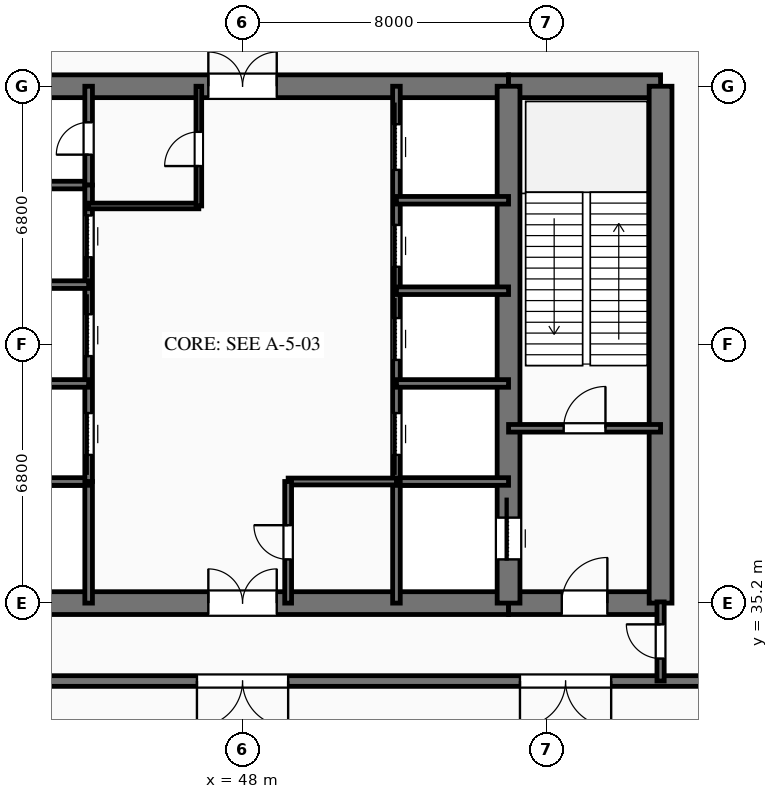
"""IFC4 building model, lengths in metres.
Left out: names, types, materials, properties, quantities, classifications, styles, units other than length and angle.
Written with IfcOpenShell. Run it as: python <this file> out.ifc"""

import sys

from ifc_helpers import new_model, si_unit, direction, frame, frame_2d, origin, place, context, subcontext, project, spatial, rectangle, extrude, element, fill, save


model = new_model("IFC4")
c1 = context("Model", 3, precision=1e-05, world=origin(), true_north=direction((0.0, 1.0)))
c2 = subcontext(c1, "Body", "Model", "MODEL_VIEW")
j1 = project(units=[si_unit("LENGTHUNIT", "METRE"), si_unit("PLANEANGLEUNIT", "RADIAN")], contexts=[c1])
p1 = place(None, origin())
s1 = spatial("IfcSite", under=j1, at=p1, CompositionType="ELEMENT")
p2 = place(p1, origin())
s2 = spatial("IfcBuilding", under=s1, at=p2, CompositionType="ELEMENT")
p3 = place(p2, origin())
s3 = spatial("IfcBuildingStorey", under=s2, at=p3, CompositionType="ELEMENT", Elevation=0.0)
p4 = place(p3, frame((41.0, 35.2, 0.0), z_axis=(0.0, 0.0, 1.0), x_axis=(1.0, 0.0, 0.0)))
e1 = element("IfcWall", 1, at=p4, inside=s3, PredefinedType="SHEAR", context=c2, shape_type="SweptSolid", body=[
    extrude(rectangle(XDim=14.0, YDim=0.6, at=frame_2d((7.0, 0.0))), origin(), (0.0, 0.0, 1.0), 5.72),
])
p5 = place(p4, frame((6.1, 0.0, 0.0)))
e2 = element("IfcOpeningElement", 2, at=p5, cuts=e1, PredefinedType="OPENING", context=c2, shape_type="SweptSolid", body=[
    extrude(rectangle(XDim=1.8, YDim=2.25, at=frame_2d((0.9, 1.125))), frame((0.0, 0.31, 0.0), z_axis=(0.0, -1.0, 0.0), x_axis=(1.0, 0.0, 0.0)), (0.0, 0.0, 1.0), 0.62),
])
p6 = place(p3, frame((55.0, 35.2, 0.0), z_axis=(0.0, 0.0, 1.0), x_axis=(1.0, 0.0, 0.0)))
e3 = element("IfcWall", 3, at=p6, inside=s3, PredefinedType="SHEAR", context=c2, shape_type="SweptSolid", body=[
    extrude(rectangle(XDim=4.0, YDim=0.6, at=frame_2d((2.0, 0.0))), origin(), (0.0, 0.0, 1.0), 5.72),
])
p7 = place(p6, frame((1.4, 0.0, 0.0)))
e4 = element("IfcOpeningElement", 4, at=p7, cuts=e3, PredefinedType="OPENING", context=c2, shape_type="SweptSolid", body=[
    extrude(rectangle(XDim=1.2, YDim=2.15, at=frame_2d((0.6, 1.075))), frame((0.0, 0.31, 0.0), z_axis=(0.0, -1.0, 0.0), x_axis=(1.0, 0.0, 0.0)), (0.0, 0.0, 1.0), 0.62),
])
p8 = place(p3, frame((41.0, 48.8, 0.0), z_axis=(0.0, 0.0, 1.0), x_axis=(1.0, 0.0, 0.0)))
e5 = element("IfcWall", 5, at=p8, inside=s3, PredefinedType="SHEAR", context=c2, shape_type="SweptSolid", body=[
    extrude(rectangle(XDim=14.0, YDim=0.6, at=frame_2d((7.0, 0.0))), origin(), (0.0, 0.0, 1.0), 5.72),
])
p9 = place(p8, frame((6.1, 0.0, 0.0)))
e6 = element("IfcOpeningElement", 6, at=p9, cuts=e5, PredefinedType="OPENING", context=c2, shape_type="SweptSolid", body=[
    extrude(rectangle(XDim=1.8, YDim=2.25, at=frame_2d((0.9, 1.125))), frame((0.0, 0.31, 0.0), z_axis=(0.0, -1.0, 0.0), x_axis=(1.0, 0.0, 0.0)), (0.0, 0.0, 1.0), 0.62),
])
p10 = place(p3, frame((55.0, 48.8, 0.0), z_axis=(0.0, 0.0, 1.0), x_axis=(1.0, 0.0, 0.0)))
e7 = element("IfcWall", 7, at=p10, inside=s3, PredefinedType="SHEAR", context=c2, shape_type="SweptSolid", body=[
    extrude(rectangle(XDim=4.0, YDim=0.6, at=frame_2d((2.0, 0.0))), origin(), (0.0, 0.0, 1.0), 5.72),
])
p11 = place(p3, frame((59.0, 35.2, 0.0), z_axis=(0.0, 0.0, 1.0), x_axis=(0.0, 1.0, 0.0)))
e8 = element("IfcWall", 8, at=p11, inside=s3, PredefinedType="SHEAR", context=c2, shape_type="SweptSolid", body=[
    extrude(rectangle(XDim=13.6, YDim=0.6, at=frame_2d((6.8, 0.0))), origin(), (0.0, 0.0, 1.0), 5.72),
])
p12 = place(p3, frame((55.0, 35.2, 0.0), z_axis=(0.0, 0.0, 1.0), x_axis=(0.0, 1.0, 0.0)))
e9 = element("IfcWall", 9, at=p12, inside=s3, PredefinedType="SHEAR", context=c2, shape_type="SweptSolid", body=[
    extrude(rectangle(XDim=13.6, YDim=0.6, at=frame_2d((6.8, 0.0))), origin(), (0.0, 0.0, 1.0), 5.72),
])
p13 = place(p12, frame((1.15, 0.0, 0.0)))
e10 = element("IfcOpeningElement", 10, at=p13, cuts=e9, PredefinedType="OPENING", context=c2, shape_type="SweptSolid", body=[
    extrude(rectangle(XDim=1.1, YDim=2.2, at=frame_2d((0.55, 1.1))), frame((0.0, 0.31, 0.0), z_axis=(0.0, -1.0, 0.0), x_axis=(1.0, 0.0, 0.0)), (0.0, 0.0, 1.0), 0.62),
])
p14 = place(p3, frame((88.0, 33.15, 0.0), z_axis=(0.0, 0.0, 1.0), x_axis=(-1.0, 0.0, 0.0)))
e11 = element("IfcWall", 11, at=p14, inside=s3, PredefinedType="SOLIDWALL", context=c2, shape_type="SweptSolid", body=[
    extrude(rectangle(XDim=80.0, YDim=0.28, at=frame_2d((40.0, 0.0))), origin(), (0.0, 0.0, 1.0), 5.72),
])
p15 = place(p14, frame((47.3, 0.0, 0.0)))
e12 = element("IfcOpeningElement", 12, at=p15, cuts=e11, PredefinedType="OPENING", context=c2, shape_type="SweptSolid", body=[
    extrude(rectangle(XDim=2.4, YDim=2.6, at=frame_2d((1.2, 1.3))), frame((0.0, 0.15, 0.0), z_axis=(0.0, -1.0, 0.0), x_axis=(1.0, 0.0, 0.0)), (0.0, 0.0, 1.0), 0.3),
])
p16 = place(p14, frame((38.8, 0.0, 0.0)))
e13 = element("IfcOpeningElement", 13, at=p16, cuts=e11, PredefinedType="OPENING", context=c2, shape_type="SweptSolid", body=[
    extrude(rectangle(XDim=2.4, YDim=2.6, at=frame_2d((1.2, 1.3))), frame((0.0, 0.15, 0.0), z_axis=(0.0, -1.0, 0.0), x_axis=(1.0, 0.0, 0.0)), (0.0, 0.0, 1.0), 0.3),
])
p17 = place(p14, frame((30.3, 0.0, 0.0)))
e14 = element("IfcOpeningElement", 14, at=p17, cuts=e11, PredefinedType="OPENING", context=c2, shape_type="SweptSolid", body=[
    extrude(rectangle(XDim=2.4, YDim=2.6, at=frame_2d((1.2, 1.3))), frame((0.0, 0.15, 0.0), z_axis=(0.0, -1.0, 0.0), x_axis=(1.0, 0.0, 0.0)), (0.0, 0.0, 1.0), 0.3),
])
p18 = place(p3, frame((55.0, 39.8, 0.0), z_axis=(0.0, 0.0, 1.0), x_axis=(1.0, 0.0, 0.0)))
e15 = element("IfcWall", 15, at=p18, inside=s3, PredefinedType="SOLIDWALL", context=c2, shape_type="SweptSolid", body=[
    extrude(rectangle(XDim=4.0, YDim=0.2, at=frame_2d((2.0, 0.0))), origin(), (0.0, 0.0, 1.0), 4.92),
])
p19 = place(p18, frame((1.45, 0.0, 0.0)))
e16 = element("IfcOpeningElement", 16, at=p19, cuts=e15, PredefinedType="OPENING", context=c2, shape_type="SweptSolid", body=[
    extrude(rectangle(XDim=1.1, YDim=2.15, at=frame_2d((0.55, 1.075))), frame((0.0, 0.11, 0.0), z_axis=(0.0, -1.0, 0.0), x_axis=(1.0, 0.0, 0.0)), (0.0, 0.0, 1.0), 0.22),
])
p20 = place(p3, frame((43.95, 35.2, 0.0), z_axis=(0.0, 0.0, 1.0), x_axis=(0.0, 1.0, 0.0)))
e17 = element("IfcWall", 17, at=p20, inside=s3, PredefinedType="SOLIDWALL", context=c2, shape_type="SweptSolid", body=[
    extrude(rectangle(XDim=3.2, YDim=0.2, at=frame_2d((1.6, 0.0))), origin(), (0.0, 0.0, 1.0), 4.92),
])
p21 = place(p3, frame((41.0, 38.4, 0.0), z_axis=(0.0, 0.0, 1.0), x_axis=(1.0, 0.0, 0.0)))
e18 = element("IfcWall", 18, at=p21, inside=s3, PredefinedType="SOLIDWALL", context=c2, shape_type="SweptSolid", body=[
    extrude(rectangle(XDim=2.95, YDim=0.2, at=frame_2d((1.475, 0.0))), origin(), (0.0, 0.0, 1.0), 4.92),
])
p22 = place(p3, frame((52.05, 35.2, 0.0), z_axis=(0.0, 0.0, 1.0), x_axis=(0.0, 1.0, 0.0)))
e19 = element("IfcWall", 19, at=p22, inside=s3, PredefinedType="SOLIDWALL", context=c2, shape_type="SweptSolid", body=[
    extrude(rectangle(XDim=3.2, YDim=0.2, at=frame_2d((1.6, 0.0))), origin(), (0.0, 0.0, 1.0), 4.92),
])
for number, where, z_axis, x_axis in (
    (20, (52.05, 38.4, 0.0), (0.0, 0.0, 1.0), (1.0, 0.0, 0.0)),
    (21, (41.0, 46.2, 0.0), (0.0, 0.0, 1.0), (1.0, 0.0, 0.0)),
):
    element("IfcWall", number, at=place(p3, frame(where, z_axis=z_axis, x_axis=x_axis)), inside=s3, PredefinedType="SOLIDWALL", context=c2, shape_type="SweptSolid", body=[
        extrude(rectangle(XDim=2.95, YDim=0.2, at=frame_2d((1.475, 0.0))), origin(), (0.0, 0.0, 1.0), 4.92),
    ])
p23 = place(p3, frame((43.95, 46.2, 0.0), z_axis=(0.0, 0.0, 1.0), x_axis=(0.0, 1.0, 0.0)))
e22 = element("IfcWall", 22, at=p23, inside=s3, PredefinedType="SOLIDWALL", context=c2, shape_type="SweptSolid", body=[
    extrude(rectangle(XDim=2.6, YDim=0.2, at=frame_2d((1.3, 0.0))), origin(), (0.0, 0.0, 1.0), 4.92),
])
p24 = place(p23, frame((0.8, 0.0, 0.0)))
e23 = element("IfcOpeningElement", 23, at=p24, cuts=e22, PredefinedType="OPENING", context=c2, shape_type="SweptSolid", body=[
    extrude(rectangle(XDim=0.85, YDim=2.15, at=frame_2d((0.425, 1.075))), frame((0.0, 0.11, 0.0), z_axis=(0.0, -1.0, 0.0), x_axis=(1.0, 0.0, 0.0)), (0.0, 0.0, 1.0), 0.22),
])
p25 = place(p3, frame((43.95, 38.4, 0.0), z_axis=(0.0, 0.0, 1.0), x_axis=(0.0, 1.0, 0.0)))
e24 = element("IfcWall", 24, at=p25, inside=s3, PredefinedType="SOLIDWALL", context=c2, shape_type="SweptSolid", body=[
    extrude(rectangle(XDim=7.8, YDim=0.2, at=frame_2d((3.9, 0.0))), origin(), (0.0, 0.0, 1.0), 4.92),
])
p26 = place(p25, frame((0.7, 0.0, 0.0)))
e25 = element("IfcOpeningElement", 25, at=p26, cuts=e24, PredefinedType="OPENING", context=c2, shape_type="SweptSolid", body=[
    extrude(rectangle(XDim=1.1, YDim=2.2, at=frame_2d((0.55, 1.1))), frame((0.0, 0.11, 0.0), z_axis=(0.0, -1.0, 0.0), x_axis=(1.0, 0.0, 0.0)), (0.0, 0.0, 1.0), 0.22),
])
p27 = place(p25, frame((3.3, 0.0, 0.0)))
e26 = element("IfcOpeningElement", 26, at=p27, cuts=e24, PredefinedType="OPENING", context=c2, shape_type="SweptSolid", body=[
    extrude(rectangle(XDim=1.1, YDim=2.2, at=frame_2d((0.55, 1.1))), frame((0.0, 0.11, 0.0), z_axis=(0.0, -1.0, 0.0), x_axis=(1.0, 0.0, 0.0)), (0.0, 0.0, 1.0), 0.22),
])
p28 = place(p25, frame((5.9, 0.0, 0.0)))
e27 = element("IfcOpeningElement", 27, at=p28, cuts=e24, PredefinedType="OPENING", context=c2, shape_type="SweptSolid", body=[
    extrude(rectangle(XDim=1.1, YDim=2.2, at=frame_2d((0.55, 1.1))), frame((0.0, 0.11, 0.0), z_axis=(0.0, -1.0, 0.0), x_axis=(1.0, 0.0, 0.0)), (0.0, 0.0, 1.0), 0.22),
])
for number, where, z_axis, x_axis in (
    (28, (41.0, 40.98, 0.0), (0.0, 0.0, 1.0), (1.0, 0.0, 0.0)),
    (29, (41.0, 43.58, 0.0), (0.0, 0.0, 1.0), (1.0, 0.0, 0.0)),
):
    element("IfcWall", number, at=place(p3, frame(where, z_axis=z_axis, x_axis=x_axis)), inside=s3, PredefinedType="SOLIDWALL", context=c2, shape_type="SweptSolid", body=[
        extrude(rectangle(XDim=2.95, YDim=0.2, at=frame_2d((1.475, 0.0))), origin(), (0.0, 0.0, 1.0), 4.92),
    ])
p29 = place(p3, frame((52.05, 38.4, 0.0), z_axis=(0.0, 0.0, 1.0), x_axis=(0.0, 1.0, 0.0)))
e30 = element("IfcWall", 30, at=p29, inside=s3, PredefinedType="SOLIDWALL", context=c2, shape_type="SweptSolid", body=[
    extrude(rectangle(XDim=10.4, YDim=0.2, at=frame_2d((5.2, 0.0))), origin(), (0.0, 0.0, 1.0), 4.92),
])
p30 = place(p29, frame((0.7, 0.0, 0.0)))
e31 = element("IfcOpeningElement", 31, at=p30, cuts=e30, PredefinedType="OPENING", context=c2, shape_type="SweptSolid", body=[
    extrude(rectangle(XDim=1.1, YDim=2.2, at=frame_2d((0.55, 1.1))), frame((0.0, 0.11, 0.0), z_axis=(0.0, -1.0, 0.0), x_axis=(1.0, 0.0, 0.0)), (0.0, 0.0, 1.0), 0.22),
])
p31 = place(p29, frame((3.2, 0.0, 0.0)))
e32 = element("IfcOpeningElement", 32, at=p31, cuts=e30, PredefinedType="OPENING", context=c2, shape_type="SweptSolid", body=[
    extrude(rectangle(XDim=1.1, YDim=2.2, at=frame_2d((0.55, 1.1))), frame((0.0, 0.11, 0.0), z_axis=(0.0, -1.0, 0.0), x_axis=(1.0, 0.0, 0.0)), (0.0, 0.0, 1.0), 0.22),
])
p32 = place(p29, frame((5.65, 0.0, 0.0)))
e33 = element("IfcOpeningElement", 33, at=p32, cuts=e30, PredefinedType="OPENING", context=c2, shape_type="SweptSolid", body=[
    extrude(rectangle(XDim=1.1, YDim=2.2, at=frame_2d((0.55, 1.1))), frame((0.0, 0.11, 0.0), z_axis=(0.0, -1.0, 0.0), x_axis=(1.0, 0.0, 0.0)), (0.0, 0.0, 1.0), 0.22),
])
p33 = place(p29, frame((8.2, 0.0, 0.0)))
e34 = element("IfcOpeningElement", 34, at=p33, cuts=e30, PredefinedType="OPENING", context=c2, shape_type="SweptSolid", body=[
    extrude(rectangle(XDim=1.2, YDim=2.2, at=frame_2d((0.6, 1.1))), frame((0.0, 0.11, 0.0), z_axis=(0.0, -1.0, 0.0), x_axis=(1.0, 0.0, 0.0)), (0.0, 0.0, 1.0), 0.22),
])
for number, where, z_axis, x_axis in (
    (35, (52.05, 40.98, 0.0), (0.0, 0.0, 1.0), (1.0, 0.0, 0.0)),
    (36, (52.05, 43.42, 0.0), (0.0, 0.0, 1.0), (1.0, 0.0, 0.0)),
    (37, (52.05, 45.8, 0.0), (0.0, 0.0, 1.0), (1.0, 0.0, 0.0)),
):
    element("IfcWall", number, at=place(p3, frame(where, z_axis=z_axis, x_axis=x_axis)), inside=s3, PredefinedType="SOLIDWALL", context=c2, shape_type="SweptSolid", body=[
        extrude(rectangle(XDim=2.95, YDim=0.2, at=frame_2d((1.475, 0.0))), origin(), (0.0, 0.0, 1.0), 4.92),
    ])
p34 = place(p3, frame((43.95, 45.65, 0.0), z_axis=(0.0, 0.0, 1.0), x_axis=(1.0, 0.0, 0.0)))
e38 = element("IfcWall", 38, at=p34, inside=s3, PredefinedType="PARTITIONING", context=c2, shape_type="SweptSolid", body=[
    extrude(rectangle(XDim=2.9, YDim=0.15, at=frame_2d((1.45, 0.0))), origin(), (0.0, 0.0, 1.0), 4.92),
])
p35 = place(p3, frame((46.85, 45.65, 0.0), z_axis=(0.0, 0.0, 1.0), x_axis=(0.0, 1.0, 0.0)))
e39 = element("IfcWall", 39, at=p35, inside=s3, PredefinedType="PARTITIONING", context=c2, shape_type="SweptSolid", body=[
    extrude(rectangle(XDim=3.15, YDim=0.15, at=frame_2d((1.575, 0.0))), origin(), (0.0, 0.0, 1.0), 4.92),
])
p36 = place(p35, frame((1.05, 0.0, 0.0)))
e40 = element("IfcOpeningElement", 40, at=p36, cuts=e39, PredefinedType="OPENING", context=c2, shape_type="SweptSolid", body=[
    extrude(rectangle(XDim=0.9, YDim=2.15, at=frame_2d((0.45, 1.075))), frame((0.0, 0.085, 0.0), z_axis=(0.0, -1.0, 0.0), x_axis=(1.0, 0.0, 0.0)), (0.0, 0.0, 1.0), 0.17),
])
p37 = place(p3, frame((49.2, 38.4, 0.0), z_axis=(0.0, 0.0, 1.0), x_axis=(1.0, 0.0, 0.0)))
e41 = element("IfcWall", 41, at=p37, inside=s3, PredefinedType="PLUMBINGWALL", context=c2, shape_type="SweptSolid", body=[
    extrude(rectangle(XDim=2.85, YDim=0.18, at=frame_2d((1.425, 0.0))), origin(), (0.0, 0.0, 1.0), 4.92),
])
p38 = place(p3, frame((49.2, 35.2, 0.0), z_axis=(0.0, 0.0, 1.0), x_axis=(0.0, 1.0, 0.0)))
e42 = element("IfcWall", 42, at=p38, inside=s3, PredefinedType="PLUMBINGWALL", context=c2, shape_type="SweptSolid", body=[
    extrude(rectangle(XDim=3.2, YDim=0.18, at=frame_2d((1.6, 0.0))), origin(), (0.0, 0.0, 1.0), 4.92),
])
p39 = place(p38, frame((1.15, 0.0, 0.0)))
e43 = element("IfcOpeningElement", 43, at=p39, cuts=e42, PredefinedType="OPENING", context=c2, shape_type="SweptSolid", body=[
    extrude(rectangle(XDim=0.9, YDim=2.1, at=frame_2d((0.45, 1.05))), frame((0.0, 0.1, 0.0), z_axis=(0.0, -1.0, 0.0), x_axis=(1.0, 0.0, 0.0)), (0.0, 0.0, 1.0), 0.2),
])
p40 = place(p3, frame((59.0, 33.15, 0.0), z_axis=(0.0, 0.0, 1.0), x_axis=(0.0, 1.0, 0.0)))
e44 = element("IfcWall", 44, at=p40, inside=s3, PredefinedType="PARTITIONING", context=c2, shape_type="SweptSolid", body=[
    extrude(rectangle(XDim=2.082, YDim=0.19, at=frame_2d((1.041, 0.0))), origin(), (0.0, 0.0, 1.0), 4.92),
])
p41 = place(p40, frame((0.591, 0.0, 0.0)))
e45 = element("IfcOpeningElement", 45, at=p41, cuts=e44, PredefinedType="OPENING", context=c2, shape_type="SweptSolid", body=[
    extrude(rectangle(XDim=0.9, YDim=2.15, at=frame_2d((0.45, 1.075))), frame((0.0, 0.105, 0.0), z_axis=(0.0, -1.0, 0.0), x_axis=(1.0, 0.0, 0.0)), (0.0, 0.0, 1.0), 0.21),
])
p42 = place(p16, origin())
e46 = element("IfcDoor", 46, at=p42, inside=s3, OperationType="DOUBLE_DOOR_SINGLE_SWING", PredefinedType="DOOR", context=c2, shape_type="SweptSolid", body=[
    extrude(rectangle(XDim=2.4, YDim=2.6, at=frame_2d((1.2, 1.3))), frame((0.0, 0.025, 0.0), z_axis=(0.0, -1.0, 0.0), x_axis=(1.0, 0.0, 0.0)), (0.0, 0.0, 1.0), 0.05),
])
fill(e13, e46)
p43 = place(p17, origin())
e47 = element("IfcDoor", 47, at=p43, inside=s3, OperationType="DOUBLE_DOOR_SINGLE_SWING", PredefinedType="DOOR", context=c2, shape_type="SweptSolid", body=[
    extrude(rectangle(XDim=2.4, YDim=2.6, at=frame_2d((1.2, 1.3))), frame((0.0, 0.025, 0.0), z_axis=(0.0, -1.0, 0.0), x_axis=(1.0, 0.0, 0.0)), (0.0, 0.0, 1.0), 0.05),
])
fill(e14, e47)
p44 = place(p13, origin())
e48 = element("IfcDoor", 48, at=p44, inside=s3, OperationType="SLIDING_TO_RIGHT", PredefinedType="DOOR", context=c2, shape_type="SweptSolid", body=[
    extrude(rectangle(XDim=1.1, YDim=2.2, at=frame_2d((0.55, 1.1))), frame((0.0, 0.025, 0.0), z_axis=(0.0, -1.0, 0.0), x_axis=(1.0, 0.0, 0.0)), (0.0, 0.0, 1.0), 0.05),
])
fill(e10, e48)
p45 = place(p7, origin())
e49 = element("IfcDoor", 49, at=p45, inside=s3, OperationType="SINGLE_SWING_RIGHT", PredefinedType="DOOR", context=c2, shape_type="SweptSolid", body=[
    extrude(rectangle(XDim=1.2, YDim=2.15, at=frame_2d((0.6, 1.075))), frame((0.0, 0.025, 0.0), z_axis=(0.0, -1.0, 0.0), x_axis=(1.0, 0.0, 0.0)), (0.0, 0.0, 1.0), 0.05),
])
fill(e4, e49)
p46 = place(p5, origin())
e50 = element("IfcDoor", 50, at=p46, inside=s3, OperationType="DOUBLE_DOOR_SINGLE_SWING", PredefinedType="DOOR", context=c2, shape_type="SweptSolid", body=[
    extrude(rectangle(XDim=1.8, YDim=2.25, at=frame_2d((0.9, 1.125))), frame((0.0, 0.025, 0.0), z_axis=(0.0, -1.0, 0.0), x_axis=(1.0, 0.0, 0.0)), (0.0, 0.0, 1.0), 0.05),
])
fill(e2, e50)
p47 = place(p9, origin())
e51 = element("IfcDoor", 51, at=p47, inside=s3, OperationType="DOUBLE_DOOR_SINGLE_SWING", PredefinedType="DOOR", context=c2, shape_type="SweptSolid", body=[
    extrude(rectangle(XDim=1.8, YDim=2.25, at=frame_2d((0.9, 1.125))), frame((0.0, 0.025, 0.0), z_axis=(0.0, -1.0, 0.0), x_axis=(1.0, 0.0, 0.0)), (0.0, 0.0, 1.0), 0.05),
])
fill(e6, e51)
p48 = place(p19, origin())
e52 = element("IfcDoor", 52, at=p48, inside=s3, OperationType="SINGLE_SWING_RIGHT", PredefinedType="DOOR", context=c2, shape_type="SweptSolid", body=[
    extrude(rectangle(XDim=1.1, YDim=2.15, at=frame_2d((0.55, 1.075))), frame((0.0, 0.025, 0.0), z_axis=(0.0, -1.0, 0.0), x_axis=(1.0, 0.0, 0.0)), (0.0, 0.0, 1.0), 0.05),
])
fill(e16, e52)
p49 = place(p24, origin())
e53 = element("IfcDoor", 53, at=p49, inside=s3, OperationType="SINGLE_SWING_LEFT", PredefinedType="DOOR", context=c2, shape_type="SweptSolid", body=[
    extrude(rectangle(XDim=0.85, YDim=2.15, at=frame_2d((0.425, 1.075))), frame((0.0, 0.025, 0.0), z_axis=(0.0, -1.0, 0.0), x_axis=(1.0, 0.0, 0.0)), (0.0, 0.0, 1.0), 0.05),
])
fill(e23, e53)
p50 = place(p26, origin())
e54 = element("IfcDoor", 54, at=p50, inside=s3, OperationType="SLIDING_TO_LEFT", PredefinedType="DOOR", context=c2, shape_type="SweptSolid", body=[
    extrude(rectangle(XDim=1.1, YDim=2.2, at=frame_2d((0.55, 1.1))), frame((0.0, 0.025, 0.0), z_axis=(0.0, -1.0, 0.0), x_axis=(1.0, 0.0, 0.0)), (0.0, 0.0, 1.0), 0.05),
])
fill(e25, e54)
p51 = place(p27, origin())
e55 = element("IfcDoor", 55, at=p51, inside=s3, OperationType="SLIDING_TO_RIGHT", PredefinedType="DOOR", context=c2, shape_type="SweptSolid", body=[
    extrude(rectangle(XDim=1.1, YDim=2.2, at=frame_2d((0.55, 1.1))), frame((0.0, 0.025, 0.0), z_axis=(0.0, -1.0, 0.0), x_axis=(1.0, 0.0, 0.0)), (0.0, 0.0, 1.0), 0.05),
])
fill(e26, e55)
p52 = place(p28, origin())
e56 = element("IfcDoor", 56, at=p52, inside=s3, OperationType="SLIDING_TO_LEFT", PredefinedType="DOOR", context=c2, shape_type="SweptSolid", body=[
    extrude(rectangle(XDim=1.1, YDim=2.2, at=frame_2d((0.55, 1.1))), frame((0.0, 0.025, 0.0), z_axis=(0.0, -1.0, 0.0), x_axis=(1.0, 0.0, 0.0)), (0.0, 0.0, 1.0), 0.05),
])
fill(e27, e56)
p53 = place(p30, origin())
e57 = element("IfcDoor", 57, at=p53, inside=s3, OperationType="SLIDING_TO_LEFT", PredefinedType="DOOR", context=c2, shape_type="SweptSolid", body=[
    extrude(rectangle(XDim=1.1, YDim=2.2, at=frame_2d((0.55, 1.1))), frame((0.0, 0.025, 0.0), z_axis=(0.0, -1.0, 0.0), x_axis=(1.0, 0.0, 0.0)), (0.0, 0.0, 1.0), 0.05),
])
fill(e31, e57)
p54 = place(p31, origin())
e58 = element("IfcDoor", 58, at=p54, inside=s3, OperationType="SLIDING_TO_RIGHT", PredefinedType="DOOR", context=c2, shape_type="SweptSolid", body=[
    extrude(rectangle(XDim=1.1, YDim=2.2, at=frame_2d((0.55, 1.1))), frame((0.0, 0.025, 0.0), z_axis=(0.0, -1.0, 0.0), x_axis=(1.0, 0.0, 0.0)), (0.0, 0.0, 1.0), 0.05),
])
fill(e32, e58)
p55 = place(p32, origin())
e59 = element("IfcDoor", 59, at=p55, inside=s3, OperationType="SLIDING_TO_LEFT", PredefinedType="DOOR", context=c2, shape_type="SweptSolid", body=[
    extrude(rectangle(XDim=1.1, YDim=2.2, at=frame_2d((0.55, 1.1))), frame((0.0, 0.025, 0.0), z_axis=(0.0, -1.0, 0.0), x_axis=(1.0, 0.0, 0.0)), (0.0, 0.0, 1.0), 0.05),
])
fill(e33, e59)
p56 = place(p33, origin())
e60 = element("IfcDoor", 60, at=p56, inside=s3, OperationType="SLIDING_TO_RIGHT", PredefinedType="DOOR", context=c2, shape_type="SweptSolid", body=[
    extrude(rectangle(XDim=1.2, YDim=2.2, at=frame_2d((0.6, 1.1))), frame((0.0, 0.025, 0.0), z_axis=(0.0, -1.0, 0.0), x_axis=(1.0, 0.0, 0.0)), (0.0, 0.0, 1.0), 0.05),
])
fill(e34, e60)
p57 = place(p36, origin())
e61 = element("IfcDoor", 61, at=p57, inside=s3, OperationType="SINGLE_SWING_LEFT", PredefinedType="DOOR", context=c2, shape_type="SweptSolid", body=[
    extrude(rectangle(XDim=0.9, YDim=2.15, at=frame_2d((0.45, 1.075))), frame((0.0, 0.025, 0.0), z_axis=(0.0, -1.0, 0.0), x_axis=(1.0, 0.0, 0.0)), (0.0, 0.0, 1.0), 0.05),
])
fill(e40, e61)
p58 = place(p39, origin())
e62 = element("IfcDoor", 62, at=p58, inside=s3, OperationType="SINGLE_SWING_RIGHT", PredefinedType="DOOR", context=c2, shape_type="SweptSolid", body=[
    extrude(rectangle(XDim=0.9, YDim=2.1, at=frame_2d((0.45, 1.05))), frame((0.0, 0.025, 0.0), z_axis=(0.0, -1.0, 0.0), x_axis=(1.0, 0.0, 0.0)), (0.0, 0.0, 1.0), 0.05),
])
fill(e43, e62)
p59 = place(p41, origin())
e63 = element("IfcDoor", 63, at=p59, inside=s3, OperationType="SINGLE_SWING_RIGHT", PredefinedType="DOOR", context=c2, shape_type="SweptSolid", body=[
    extrude(rectangle(XDim=0.9, YDim=2.15, at=frame_2d((0.45, 1.075))), frame((0.0, 0.025, 0.0), z_axis=(0.0, -1.0, 0.0), x_axis=(1.0, 0.0, 0.0)), (0.0, 0.0, 1.0), 0.05),
])
fill(e45, e63)
save(model, sys.argv[1])
